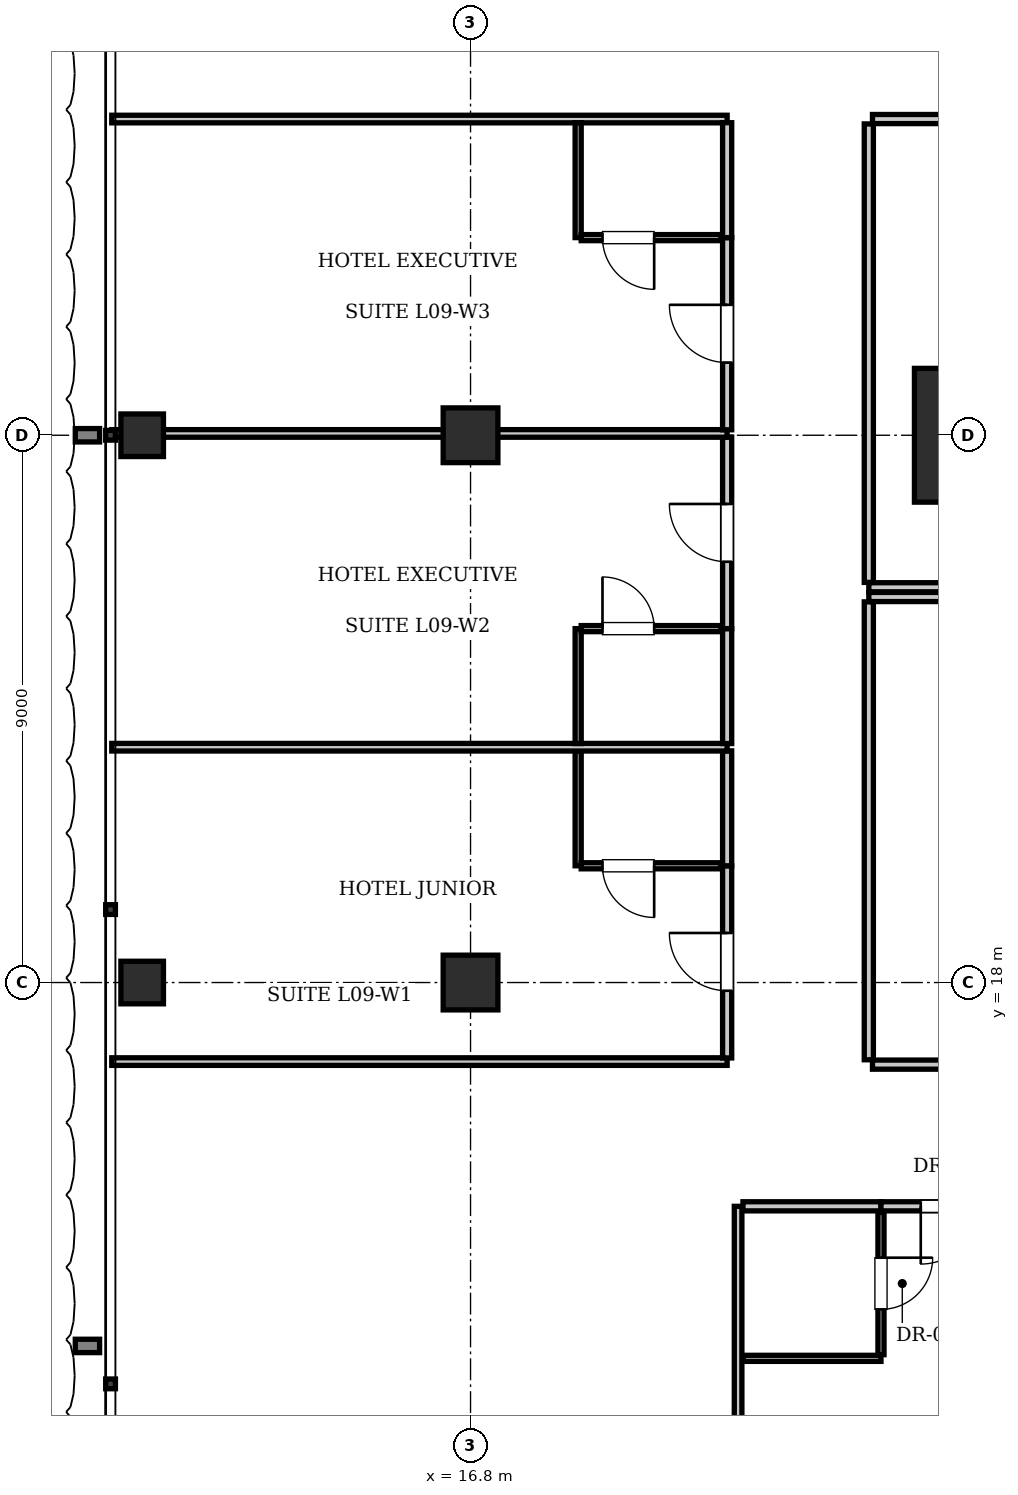
"""IFC4 building model, lengths in metres.
Left out: names, types, materials, properties, quantities, classifications, styles, units other than length and angle.
Written with IfcOpenShell. Run it as: python <this file> out.ifc"""

import sys

from ifc_helpers import new_model, si_unit, direction, frame, frame_2d, origin, origin_2d, place, context, subcontext, project, spatial, rectangle, i_section, extrude, element, fill, save


model = new_model("IFC4")
c1 = context("Model", 3, precision=1e-05, world=origin(), true_north=direction((0.0, 1.0)))
c2 = subcontext(c1, "Body", "Model", "MODEL_VIEW")
j1 = project(units=[si_unit("LENGTHUNIT", "METRE"), si_unit("PLANEANGLEUNIT", "RADIAN")], contexts=[c1])
p1 = place(None, origin())
s1 = spatial("IfcSite", under=j1, at=p1, CompositionType="ELEMENT")
p2 = place(p1, origin())
s2 = spatial("IfcBuilding", under=s1, at=p2, CompositionType="ELEMENT")
p3 = place(p2, frame((0.0, 0.0, 42.35)))
s3 = spatial("IfcBuildingStorey", under=s2, at=p3, CompositionType="ELEMENT", Elevation=42.35)
p4 = place(p3, frame((25.2, 27.0, 0.0), z_axis=(0.0, 0.0, 1.0), x_axis=(1.0, 0.0, 0.0)))
e1 = element("IfcColumn", 1, at=p4, inside=s3, PredefinedType="COLUMN", context=c2, shape_type="SweptSolid", body=[
    extrude(rectangle(XDim=2.2, YDim=2.2, at=origin_2d()), origin(), (0.0, 0.0, 1.0), 3.85),
])
for number, where, z_axis, x_axis in (
    (2, (16.8, 18.0, 0.0), (0.0, 0.0, 1.0), (1.0, 0.0, 0.0)),
    (3, (16.8, 27.0, 0.0), (0.0, 0.0, 1.0), (1.0, 0.0, 0.0)),
):
    element("IfcColumn", number, at=place(p3, frame(where, z_axis=z_axis, x_axis=x_axis)), inside=s3, PredefinedType="COLUMN", context=c2, shape_type="SweptSolid", body=[
        extrude(rectangle(XDim=0.9, YDim=0.9, at=origin_2d()), origin(), (0.0, 0.0, 1.0), 3.85),
    ])
for number, where, z_axis, x_axis in (
    (4, (11.4, 18.0, 0.0), (0.0, 0.0, 1.0), (1.0, 0.0, 0.0)),
    (5, (11.4, 27.0, 0.0), (0.0, 0.0, 1.0), (1.0, 0.0, 0.0)),
):
    element("IfcColumn", number, at=place(p3, frame(where, z_axis=z_axis, x_axis=x_axis)), inside=s3, PredefinedType="COLUMN", context=c2, shape_type="SweptSolid", body=[
        extrude(i_section(OverallWidth=0.7, OverallDepth=0.7, WebThickness=0.028, FlangeThickness=0.044, at=origin_2d()), origin(), (0.0, 0.0, 1.0), 3.85),
    ])
p5 = place(p3, frame((23.35, 24.5, 0.0), z_axis=(0.0, 0.0, 1.0), x_axis=(1.0, 0.0, 0.0)))
e6 = element("IfcWall", 6, at=p5, inside=s3, PredefinedType="PARTITIONING", context=c2, shape_type="SweptSolid", body=[
    extrude(rectangle(XDim=28.9, YDim=0.15, at=frame_2d((14.45, 0.0))), origin(), (0.0, 0.0, 1.0), 3.61),
])
p6 = place(p3, frame((23.35, 24.58, 0.0), z_axis=(0.0, 0.0, 1.0), x_axis=(0.0, 1.0, 0.0)))
e7 = element("IfcWall", 7, at=p6, inside=s3, PredefinedType="PARTITIONING", context=c2, shape_type="SweptSolid", body=[
    extrude(rectangle(XDim=7.54, YDim=0.15, at=frame_2d((3.77, 0.0))), origin(), (0.0, 0.0, 1.0), 3.61),
])
p7 = place(p3, frame((23.41, 32.2, 0.0), z_axis=(0.0, 0.0, 1.0), x_axis=(1.0, 0.0, 0.0)))
e8 = element("IfcWall", 8, at=p7, inside=s3, PredefinedType="PARTITIONING", context=c2, shape_type="SweptSolid", body=[
    extrude(rectangle(XDim=6.557, YDim=0.15, at=frame_2d((3.279, 0.0))), origin(), (0.0, 0.0, 1.0), 3.61),
])
p8 = place(p7, frame((2.829, 0.0, 0.0)))
e9 = element("IfcOpeningElement", 9, at=p8, cuts=e8, PredefinedType="OPENING", context=c2, shape_type="SweptSolid", body=[
    extrude(rectangle(XDim=0.9, YDim=2.1, at=frame_2d((0.45, 1.05))), frame((0.0, 0.085, 0.0), z_axis=(0.0, -1.0, 0.0), x_axis=(1.0, 0.0, 0.0)), (0.0, 0.0, 1.0), 0.17),
])
p9 = place(p3, frame((23.35, 24.34, 0.0), z_axis=(0.0, 0.0, 1.0), x_axis=(1.0, 0.0, 0.0)))
e10 = element("IfcWall", 10, at=p9, inside=s3, PredefinedType="PARTITIONING", context=c2, shape_type="SweptSolid", body=[
    extrude(rectangle(XDim=28.9, YDim=0.15, at=frame_2d((14.45, 0.0))), origin(), (0.0, 0.0, 1.0), 3.61),
])
p10 = place(p3, frame((23.35, 16.73, 0.0), z_axis=(0.0, 0.0, 1.0), x_axis=(0.0, 1.0, 0.0)))
e11 = element("IfcWall", 11, at=p10, inside=s3, PredefinedType="PARTITIONING", context=c2, shape_type="SweptSolid", body=[
    extrude(rectangle(XDim=7.53, YDim=0.15, at=frame_2d((3.765, 0.0))), origin(), (0.0, 0.0, 1.0), 3.61),
])
p11 = place(p3, frame((23.41, 16.65, 0.0), z_axis=(0.0, 0.0, 1.0), x_axis=(1.0, 0.0, 0.0)))
e12 = element("IfcWall", 12, at=p11, inside=s3, PredefinedType="PARTITIONING", context=c2, shape_type="SweptSolid", body=[
    extrude(rectangle(XDim=10.603, YDim=0.15, at=frame_2d((5.302, 0.0))), origin(), (0.0, 0.0, 1.0), 3.61),
])
p12 = place(p11, frame((4.852, 0.0, 0.0)))
e13 = element("IfcOpeningElement", 13, at=p12, cuts=e12, PredefinedType="OPENING", context=c2, shape_type="SweptSolid", body=[
    extrude(rectangle(XDim=0.9, YDim=2.1, at=frame_2d((0.45, 1.05))), frame((0.0, 0.085, 0.0), z_axis=(0.0, -1.0, 0.0), x_axis=(1.0, 0.0, 0.0)), (0.0, 0.0, 1.0), 0.17),
])
p13 = place(p3, frame((21.2, 0.1, 0.0), z_axis=(0.0, 0.0, 1.0), x_axis=(0.0, 1.0, 0.0)))
e14 = element("IfcWall", 14, at=p13, inside=s3, PredefinedType="PARTITIONING", context=c2, shape_type="SweptSolid", body=[
    extrude(rectangle(XDim=14.22, YDim=0.125, at=frame_2d((7.11, 0.0))), origin(), (0.0, 0.0, 1.0), 3.61),
])
p14 = place(p3, frame((21.28, 14.32, 0.0), z_axis=(0.0, 0.0, 1.0), x_axis=(1.0, 0.0, 0.0)))
e15 = element("IfcWall", 15, at=p14, inside=s3, PredefinedType="PARTITIONING", context=c2, shape_type="SweptSolid", body=[
    extrude(rectangle(XDim=2.27, YDim=0.15, at=frame_2d((1.135, 0.0))), origin(), (0.0, 0.0, 1.0), 3.61),
])
p15 = place(p3, frame((21.28, 11.82, 0.0), z_axis=(0.0, 0.0, 1.0), x_axis=(1.0, 0.0, 0.0)))
e16 = element("IfcWall", 16, at=p15, inside=s3, PredefinedType="PARTITIONING", context=c2, shape_type="SweptSolid", body=[
    extrude(rectangle(XDim=2.27, YDim=0.1, at=frame_2d((1.135, 0.0))), origin(), (0.0, 0.0, 1.0), 3.61),
])
p16 = place(p3, frame((23.55, 11.88, 0.0), z_axis=(0.0, 0.0, 1.0), x_axis=(0.0, 1.0, 0.0)))
e17 = element("IfcWall", 17, at=p16, inside=s3, PredefinedType="PARTITIONING", context=c2, shape_type="SweptSolid", body=[
    extrude(rectangle(XDim=2.34, YDim=0.1, at=frame_2d((1.17, 0.0))), origin(), (0.0, 0.0, 1.0), 3.61),
])
p17 = place(p16, frame((0.745, 0.0, 0.0)))
e18 = element("IfcOpeningElement", 18, at=p17, cuts=e17, PredefinedType="OPENING", context=c2, shape_type="SweptSolid", body=[
    extrude(rectangle(XDim=0.85, YDim=2.1, at=frame_2d((0.425, 1.05))), frame((0.0, 0.06, 0.0), z_axis=(0.0, -1.0, 0.0), x_axis=(1.0, 0.0, 0.0)), (0.0, 0.0, 1.0), 0.12),
])
p18 = place(p3, frame((23.55, 14.32, 0.0), z_axis=(0.0, 0.0, 1.0), x_axis=(1.0, 0.0, 0.0)))
e19 = element("IfcWall", 19, at=p18, inside=s3, PredefinedType="PARTITIONING", context=c2, shape_type="SweptSolid", body=[
    extrude(rectangle(XDim=2.258, YDim=0.15, at=frame_2d((1.129, 0.0))), origin(), (0.0, 0.0, 1.0), 3.61),
])
p19 = place(p18, frame((0.654, 0.0, 0.0)))
e20 = element("IfcOpeningElement", 20, at=p19, cuts=e19, PredefinedType="OPENING", context=c2, shape_type="SweptSolid", body=[
    extrude(rectangle(XDim=0.95, YDim=2.15, at=frame_2d((0.475, 1.075))), frame((0.0, 0.085, 0.0), z_axis=(0.0, -1.0, 0.0), x_axis=(1.0, 0.0, 0.0)), (0.0, 0.0, 1.0), 0.17),
])
for number, where, z_axis, x_axis in (
    (21, (10.9, 16.7, 0.0), (0.0, 0.0, 1.0), (1.0, 0.0, 0.0)),
    (22, (10.9, 32.2, 0.0), (0.0, 0.0, 1.0), (1.0, 0.0, 0.0)),
):
    element("IfcWall", number, at=place(p3, frame(where, z_axis=z_axis, x_axis=x_axis)), inside=s3, PredefinedType="PARTITIONING", context=c2, shape_type="SweptSolid", body=[
        extrude(rectangle(XDim=10.12, YDim=0.125, at=frame_2d((5.06, 0.0))), origin(), (0.0, 0.0, 1.0), 3.61),
    ])
p20 = place(p3, frame((21.02, 16.76, 0.0), z_axis=(0.0, 0.0, 1.0), x_axis=(0.0, 1.0, 0.0)))
e23 = element("IfcWall", 23, at=p20, inside=s3, PredefinedType="PARTITIONING", context=c2, shape_type="SweptSolid", body=[
    extrude(rectangle(XDim=3.16, YDim=0.15, at=frame_2d((1.58, 0.0))), origin(), (0.0, 0.0, 1.0), 3.344),
])
p21 = place(p20, frame((1.105, 0.0, 0.0)))
e24 = element("IfcOpeningElement", 24, at=p21, cuts=e23, PredefinedType="OPENING", context=c2, shape_type="SweptSolid", body=[
    extrude(rectangle(XDim=0.95, YDim=2.15, at=frame_2d((0.475, 1.075))), frame((0.0, 0.085, 0.0), z_axis=(0.0, -1.0, 0.0), x_axis=(1.0, 0.0, 0.0)), (0.0, 0.0, 1.0), 0.17),
])
p22 = place(p3, frame((21.02, 19.92, 0.0), z_axis=(0.0, 0.0, 1.0), x_axis=(0.0, 1.0, 0.0)))
e25 = element("IfcWall", 25, at=p22, inside=s3, PredefinedType="PARTITIONING", context=c2, shape_type="SweptSolid", body=[
    extrude(rectangle(XDim=1.89, YDim=0.15, at=frame_2d((0.945, 0.0))), origin(), (0.0, 0.0, 1.0), 3.352),
])
p23 = place(p3, frame((18.57, 19.92, 0.0), z_axis=(0.0, 0.0, 1.0), x_axis=(0.0, 1.0, 0.0)))
e26 = element("IfcWall", 26, at=p23, inside=s3, PredefinedType="PARTITIONING", context=c2, shape_type="SweptSolid", body=[
    extrude(rectangle(XDim=1.89, YDim=0.1, at=frame_2d((0.945, 0.0))), origin(), (0.0, 0.0, 1.0), 3.61),
])
p24 = place(p3, frame((18.62, 19.92, 0.0), z_axis=(0.0, 0.0, 1.0), x_axis=(1.0, 0.0, 0.0)))
e27 = element("IfcWall", 27, at=p24, inside=s3, PredefinedType="PARTITIONING", context=c2, shape_type="SweptSolid", body=[
    extrude(rectangle(XDim=2.3, YDim=0.1, at=frame_2d((1.15, 0.0))), origin(), (0.0, 0.0, 1.0), 3.61),
])
p25 = place(p24, frame((0.35, 0.0, 0.0)))
e28 = element("IfcOpeningElement", 28, at=p25, cuts=e27, PredefinedType="OPENING", context=c2, shape_type="SweptSolid", body=[
    extrude(rectangle(XDim=0.85, YDim=2.1, at=frame_2d((0.425, 1.05))), frame((0.0, 0.06, 0.0), z_axis=(0.0, -1.0, 0.0), x_axis=(1.0, 0.0, 0.0)), (0.0, 0.0, 1.0), 0.12),
])
p26 = place(p3, frame((10.9, 21.87, 0.0), z_axis=(0.0, 0.0, 1.0), x_axis=(1.0, 0.0, 0.0)))
e29 = element("IfcWall", 29, at=p26, inside=s3, PredefinedType="PARTITIONING", context=c2, shape_type="SweptSolid", body=[
    extrude(rectangle(XDim=10.12, YDim=0.125, at=frame_2d((5.06, 0.0))), origin(), (0.0, 0.0, 1.0), 3.61),
])
p27 = place(p3, frame((21.02, 21.93, 0.0), z_axis=(0.0, 0.0, 1.0), x_axis=(0.0, 1.0, 0.0)))
e30 = element("IfcWall", 30, at=p27, inside=s3, PredefinedType="PARTITIONING", context=c2, shape_type="SweptSolid", body=[
    extrude(rectangle(XDim=1.89, YDim=0.15, at=frame_2d((0.945, 0.0))), origin(), (0.0, 0.0, 1.0), 3.352),
])
p28 = place(p3, frame((21.02, 23.82, 0.0), z_axis=(0.0, 0.0, 1.0), x_axis=(0.0, 1.0, 0.0)))
e31 = element("IfcWall", 31, at=p28, inside=s3, PredefinedType="PARTITIONING", context=c2, shape_type="SweptSolid", body=[
    extrude(rectangle(XDim=3.15, YDim=0.15, at=frame_2d((1.575, 0.0))), origin(), (0.0, 0.0, 1.0), 3.352),
])
p29 = place(p28, frame((1.1, 0.0, 0.0)))
e32 = element("IfcOpeningElement", 32, at=p29, cuts=e31, PredefinedType="OPENING", context=c2, shape_type="SweptSolid", body=[
    extrude(rectangle(XDim=0.95, YDim=2.15, at=frame_2d((0.475, 1.075))), frame((0.0, 0.085, 0.0), z_axis=(0.0, -1.0, 0.0), x_axis=(1.0, 0.0, 0.0)), (0.0, 0.0, 1.0), 0.17),
])
p30 = place(p3, frame((18.57, 21.93, 0.0), z_axis=(0.0, 0.0, 1.0), x_axis=(0.0, 1.0, 0.0)))
e33 = element("IfcWall", 33, at=p30, inside=s3, PredefinedType="PARTITIONING", context=c2, shape_type="SweptSolid", body=[
    extrude(rectangle(XDim=1.89, YDim=0.1, at=frame_2d((0.945, 0.0))), origin(), (0.0, 0.0, 1.0), 3.61),
])
p31 = place(p3, frame((18.62, 23.82, 0.0), z_axis=(0.0, 0.0, 1.0), x_axis=(1.0, 0.0, 0.0)))
e34 = element("IfcWall", 34, at=p31, inside=s3, PredefinedType="PARTITIONING", context=c2, shape_type="SweptSolid", body=[
    extrude(rectangle(XDim=2.3, YDim=0.1, at=frame_2d((1.15, 0.0))), origin(), (0.0, 0.0, 1.0), 3.61),
])
p32 = place(p31, frame((0.35, 0.0, 0.0)))
e35 = element("IfcOpeningElement", 35, at=p32, cuts=e34, PredefinedType="OPENING", context=c2, shape_type="SweptSolid", body=[
    extrude(rectangle(XDim=0.85, YDim=2.1, at=frame_2d((0.425, 1.05))), frame((0.0, 0.06, 0.0), z_axis=(0.0, -1.0, 0.0), x_axis=(1.0, 0.0, 0.0)), (0.0, 0.0, 1.0), 0.12),
])
p33 = place(p3, frame((10.9, 27.03, 0.0), z_axis=(0.0, 0.0, 1.0), x_axis=(1.0, 0.0, 0.0)))
e36 = element("IfcWall", 36, at=p33, inside=s3, PredefinedType="PARTITIONING", context=c2, shape_type="SweptSolid", body=[
    extrude(rectangle(XDim=10.12, YDim=0.125, at=frame_2d((5.06, 0.0))), origin(), (0.0, 0.0, 1.0), 2.988),
])
p34 = place(p3, frame((21.02, 27.09, 0.0), z_axis=(0.0, 0.0, 1.0), x_axis=(0.0, 1.0, 0.0)))
e37 = element("IfcWall", 37, at=p34, inside=s3, PredefinedType="PARTITIONING", context=c2, shape_type="SweptSolid", body=[
    extrude(rectangle(XDim=3.16, YDim=0.15, at=frame_2d((1.58, 0.0))), origin(), (0.0, 0.0, 1.0), 3.403),
])
p35 = place(p34, frame((1.105, 0.0, 0.0)))
e38 = element("IfcOpeningElement", 38, at=p35, cuts=e37, PredefinedType="OPENING", context=c2, shape_type="SweptSolid", body=[
    extrude(rectangle(XDim=0.95, YDim=2.15, at=frame_2d((0.475, 1.075))), frame((0.0, 0.085, 0.0), z_axis=(0.0, -1.0, 0.0), x_axis=(1.0, 0.0, 0.0)), (0.0, 0.0, 1.0), 0.17),
])
p36 = place(p3, frame((21.02, 30.25, 0.0), z_axis=(0.0, 0.0, 1.0), x_axis=(0.0, 1.0, 0.0)))
e39 = element("IfcWall", 39, at=p36, inside=s3, PredefinedType="PARTITIONING", context=c2, shape_type="SweptSolid", body=[
    extrude(rectangle(XDim=1.89, YDim=0.15, at=frame_2d((0.945, 0.0))), origin(), (0.0, 0.0, 1.0), 3.403),
])
p37 = place(p3, frame((18.57, 30.25, 0.0), z_axis=(0.0, 0.0, 1.0), x_axis=(0.0, 1.0, 0.0)))
e40 = element("IfcWall", 40, at=p37, inside=s3, PredefinedType="PARTITIONING", context=c2, shape_type="SweptSolid", body=[
    extrude(rectangle(XDim=1.89, YDim=0.1, at=frame_2d((0.945, 0.0))), origin(), (0.0, 0.0, 1.0), 3.61),
])
p38 = place(p3, frame((18.62, 30.25, 0.0), z_axis=(0.0, 0.0, 1.0), x_axis=(1.0, 0.0, 0.0)))
e41 = element("IfcWall", 41, at=p38, inside=s3, PredefinedType="PARTITIONING", context=c2, shape_type="SweptSolid", body=[
    extrude(rectangle(XDim=2.3, YDim=0.1, at=frame_2d((1.15, 0.0))), origin(), (0.0, 0.0, 1.0), 3.61),
])
p39 = place(p38, frame((0.35, 0.0, 0.0)))
e42 = element("IfcOpeningElement", 42, at=p39, cuts=e41, PredefinedType="OPENING", context=c2, shape_type="SweptSolid", body=[
    extrude(rectangle(XDim=0.85, YDim=2.1, at=frame_2d((0.425, 1.05))), frame((0.0, 0.06, 0.0), z_axis=(0.0, -1.0, 0.0), x_axis=(1.0, 0.0, 0.0)), (0.0, 0.0, 1.0), 0.12),
])
p40 = place(p17, frame((0.85, 0.0, 0.0), z_axis=(0.0, 0.0, 1.0), x_axis=(-1.0, 0.0, 0.0)))
e43 = element("IfcDoor", 43, at=p40, inside=s3, OperationType="SINGLE_SWING_LEFT", PredefinedType="DOOR", context=c2, shape_type="SweptSolid", body=[
    extrude(rectangle(XDim=0.85, YDim=2.1, at=frame_2d((0.425, 1.05))), frame((0.0, 0.025, 0.0), z_axis=(0.0, -1.0, 0.0), x_axis=(1.0, 0.0, 0.0)), (0.0, 0.0, 1.0), 0.05),
])
fill(e18, e43)
p41 = place(p19, frame((0.95, 0.0, 0.0), z_axis=(0.0, 0.0, 1.0), x_axis=(-1.0, 0.0, 0.0)))
e44 = element("IfcDoor", 44, at=p41, inside=s3, OperationType="SINGLE_SWING_RIGHT", PredefinedType="DOOR", context=c2, shape_type="SweptSolid", body=[
    extrude(rectangle(XDim=0.95, YDim=2.15, at=frame_2d((0.475, 1.075))), frame((0.0, 0.025, 0.0), z_axis=(0.0, -1.0, 0.0), x_axis=(1.0, 0.0, 0.0)), (0.0, 0.0, 1.0), 0.05),
])
fill(e20, e44)
p42 = place(p25, frame((0.85, 0.0, 0.0), z_axis=(0.0, 0.0, 1.0), x_axis=(-1.0, 0.0, 0.0)))
e45 = element("IfcDoor", 45, at=p42, inside=s3, OperationType="SINGLE_SWING_LEFT", PredefinedType="DOOR", context=c2, shape_type="SweptSolid", body=[
    extrude(rectangle(XDim=0.85, YDim=2.1, at=frame_2d((0.425, 1.05))), frame((0.0, 0.025, 0.0), z_axis=(0.0, -1.0, 0.0), x_axis=(1.0, 0.0, 0.0)), (0.0, 0.0, 1.0), 0.05),
])
fill(e28, e45)
p43 = place(p21, origin())
e46 = element("IfcDoor", 46, at=p43, inside=s3, OperationType="SINGLE_SWING_RIGHT", PredefinedType="DOOR", context=c2, shape_type="SweptSolid", body=[
    extrude(rectangle(XDim=0.95, YDim=2.15, at=frame_2d((0.475, 1.075))), frame((0.0, 0.025, 0.0), z_axis=(0.0, -1.0, 0.0), x_axis=(1.0, 0.0, 0.0)), (0.0, 0.0, 1.0), 0.05),
])
fill(e24, e46)
p44 = place(p32, origin())
e47 = element("IfcDoor", 47, at=p44, inside=s3, OperationType="SINGLE_SWING_LEFT", PredefinedType="DOOR", context=c2, shape_type="SweptSolid", body=[
    extrude(rectangle(XDim=0.85, YDim=2.1, at=frame_2d((0.425, 1.05))), frame((0.0, 0.025, 0.0), z_axis=(0.0, -1.0, 0.0), x_axis=(1.0, 0.0, 0.0)), (0.0, 0.0, 1.0), 0.05),
])
fill(e35, e47)
p45 = place(p29, origin())
e48 = element("IfcDoor", 48, at=p45, inside=s3, OperationType="SINGLE_SWING_RIGHT", PredefinedType="DOOR", context=c2, shape_type="SweptSolid", body=[
    extrude(rectangle(XDim=0.95, YDim=2.15, at=frame_2d((0.475, 1.075))), frame((0.0, 0.025, 0.0), z_axis=(0.0, -1.0, 0.0), x_axis=(1.0, 0.0, 0.0)), (0.0, 0.0, 1.0), 0.05),
])
fill(e32, e48)
p46 = place(p39, frame((0.85, 0.0, 0.0), z_axis=(0.0, 0.0, 1.0), x_axis=(-1.0, 0.0, 0.0)))
e49 = element("IfcDoor", 49, at=p46, inside=s3, OperationType="SINGLE_SWING_LEFT", PredefinedType="DOOR", context=c2, shape_type="SweptSolid", body=[
    extrude(rectangle(XDim=0.85, YDim=2.1, at=frame_2d((0.425, 1.05))), frame((0.0, 0.025, 0.0), z_axis=(0.0, -1.0, 0.0), x_axis=(1.0, 0.0, 0.0)), (0.0, 0.0, 1.0), 0.05),
])
fill(e42, e49)
p47 = place(p35, origin())
e50 = element("IfcDoor", 50, at=p47, inside=s3, OperationType="SINGLE_SWING_RIGHT", PredefinedType="DOOR", context=c2, shape_type="SweptSolid", body=[
    extrude(rectangle(XDim=0.95, YDim=2.15, at=frame_2d((0.475, 1.075))), frame((0.0, 0.025, 0.0), z_axis=(0.0, -1.0, 0.0), x_axis=(1.0, 0.0, 0.0)), (0.0, 0.0, 1.0), 0.05),
])
fill(e38, e50)
save(model, sys.argv[1])
